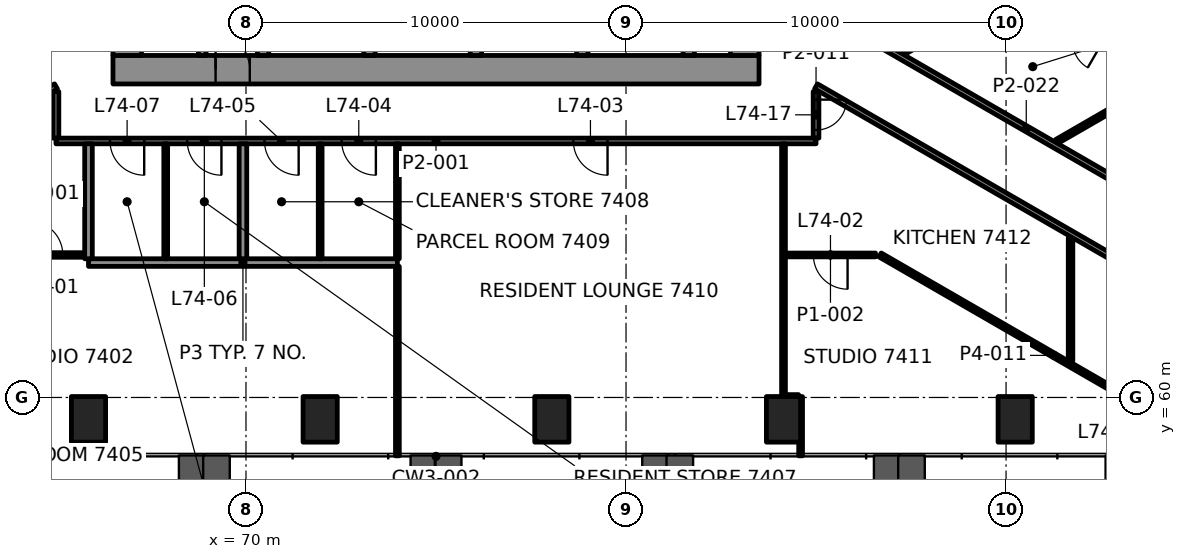
"""IFC4 building model, lengths in metres.
Left out: names, types, materials, properties, quantities, classifications, styles, units other than length and angle.
Written with IfcOpenShell. Run it as: python <this file> out.ifc"""

import sys

from ifc_helpers import new_model, si_unit, direction, frame, frame_2d, origin, origin_2d, place, context, subcontext, project, spatial, rectangle, hollow_rectangle, extrude, element, fill, save


model = new_model("IFC4")
c1 = context("Model", 3, precision=1e-05, world=origin(), true_north=direction((0.0, 1.0)))
c2 = subcontext(c1, "Body", "Model", "MODEL_VIEW")
j1 = project(units=[si_unit("LENGTHUNIT", "METRE"), si_unit("PLANEANGLEUNIT", "RADIAN")], contexts=[c1])
p1 = place(None, origin())
s1 = spatial("IfcSite", under=j1, at=p1, CompositionType="ELEMENT")
p2 = place(p1, origin())
s2 = spatial("IfcBuilding", under=s1, at=p2, CompositionType="ELEMENT")
p3 = place(p2, frame((0.0, 0.0, 305.6)))
s3 = spatial("IfcBuildingStorey", under=s2, at=p3, CompositionType="ELEMENT", Elevation=305.6)
for number, where, z_axis, x_axis in (
    (1, (65.856, 59.425, -0.0), (0.0, 0.0, 1.0), (1.0, 0.0, 0.0)),
    (2, (71.952, 59.425, -0.0), (0.0, 0.0, 1.0), (1.0, 0.0, 0.0)),
    (3, (78.048, 59.425, -0.0), (0.0, 0.0, 1.0), (1.0, 0.0, 0.0)),
    (4, (84.144, 59.425, -0.0), (0.0, 0.0, 1.0), (1.0, 0.0, 0.0)),
    (5, (90.24, 59.425, -0.0), (0.0, 0.0, 1.0), (1.0, 0.0, 0.0)),
):
    element("IfcColumn", number, at=place(p3, frame(where, z_axis=z_axis, x_axis=x_axis)), inside=s3, PredefinedType="COLUMN", context=c2, shape_type="SweptSolid", body=[
        extrude(hollow_rectangle(XDim=0.9, YDim=1.2, WallThickness=0.06, at=origin_2d()), origin(), (0.0, 0.0, 1.0), 3.5),
    ])
p4 = place(p3, frame((66.5, 68.625, 0.0), z_axis=(0.0, 0.0, 1.0), x_axis=(1.0, 0.0, 0.0)))
e6 = element("IfcWall", 6, at=p4, inside=s3, PredefinedType="SHEAR", context=c2, shape_type="SweptSolid", body=[
    extrude(rectangle(XDim=17.0, YDim=0.75, at=frame_2d((8.5, 0.0))), origin(), (0.0, 0.0, 1.0), 3.3),
])
p5 = place(p4, frame((2.7, 0.0, 0.0)))
e7 = element("IfcOpeningElement", 7, at=p5, cuts=e6, PredefinedType="OPENING", context=c2, shape_type="SweptSolid", body=[
    extrude(rectangle(XDim=0.9, YDim=2.1, at=frame_2d((0.45, 1.05))), frame((0.0, 0.385, 0.0), z_axis=(0.0, -1.0, 0.0), x_axis=(1.0, 0.0, 0.0)), (0.0, 0.0, 1.0), 0.77),
])
p6 = place(p3, frame((66.875, 69.0, 0.0), z_axis=(0.0, 0.0, 1.0), x_axis=(0.0, 1.0, 0.0)))
e8 = element("IfcWall", 8, at=p6, inside=s3, PredefinedType="SHEAR", context=c2, shape_type="SweptSolid", body=[
    extrude(rectangle(XDim=12.0, YDim=0.75, at=frame_2d((6.0, 0.0))), origin(), (0.0, 0.0, 1.0), 3.3),
])
p7 = place(p6, frame((3.7, 0.0, 0.0)))
e9 = element("IfcOpeningElement", 9, at=p7, cuts=e8, PredefinedType="OPENING", context=c2, shape_type="SweptSolid", body=[
    extrude(rectangle(XDim=1.2, YDim=2.1, at=frame_2d((0.6, 1.05))), frame((0.0, 0.385, 0.0), z_axis=(0.0, -1.0, 0.0), x_axis=(1.0, 0.0, 0.0)), (0.0, 0.0, 1.0), 0.77),
])
p8 = place(p6, frame((0.925, 0.0, 0.0)))
e10 = element("IfcOpeningElement", 10, at=p8, cuts=e8, PredefinedType="OPENING", context=c2, shape_type="SweptSolid", body=[
    extrude(rectangle(XDim=0.9, YDim=2.1, at=frame_2d((0.45, 1.05))), frame((0.0, 0.385, 0.0), z_axis=(0.0, -1.0, 0.0), x_axis=(1.0, 0.0, 0.0)), (0.0, 0.0, 1.0), 0.77),
])
p9 = place(p3, frame((83.125, 69.0, 0.0), z_axis=(0.0, 0.0, 1.0), x_axis=(0.0, 1.0, 0.0)))
e11 = element("IfcWall", 11, at=p9, inside=s3, PredefinedType="SHEAR", context=c2, shape_type="SweptSolid", body=[
    extrude(rectangle(XDim=12.0, YDim=0.75, at=frame_2d((6.0, 0.0))), origin(), (0.0, 0.0, 1.0), 3.3),
])
p10 = place(p9, frame((3.4, 0.0, 0.0)))
e12 = element("IfcOpeningElement", 12, at=p10, cuts=e11, PredefinedType="OPENING", context=c2, shape_type="SweptSolid", body=[
    extrude(rectangle(XDim=1.8, YDim=2.1, at=frame_2d((0.9, 1.05))), frame((0.0, 0.385, 0.0), z_axis=(0.0, -1.0, 0.0), x_axis=(1.0, 0.0, 0.0)), (0.0, 0.0, 1.0), 0.77),
])
for number, where, z_axis, x_axis in (
    (13, (70.45, 69.0, 0.0), (0.0, 0.0, 1.0), (0.0, 1.0, 0.0)),
    (14, (73.25, 69.0, 0.0), (0.0, 0.0, 1.0), (0.0, 1.0, 0.0)),
    (15, (76.05, 69.0, 0.0), (0.0, 0.0, 1.0), (0.0, 1.0, 0.0)),
    (16, (78.85, 69.0, 0.0), (0.0, 0.0, 1.0), (0.0, 1.0, 0.0)),
    (17, (81.65, 69.0, 0.0), (0.0, 0.0, 1.0), (0.0, 1.0, 0.0)),
):
    element("IfcWall", number, at=place(p3, frame(where, z_axis=z_axis, x_axis=x_axis)), inside=s3, PredefinedType="SHEAR", context=c2, shape_type="SweptSolid", body=[
        extrude(rectangle(XDim=2.6, YDim=0.3, at=frame_2d((1.3, 0.0))), origin(), (0.0, 0.0, 1.0), 3.3),
    ])
p11 = place(p3, frame((84.194, 60.025, 0.0), z_axis=(0.0, 0.0, 1.0), x_axis=(1.0, 0.0, 0.0)))
e18 = element("IfcWall", 18, at=p11, inside=s3, PredefinedType="PARTITIONING", context=c2, shape_type="SweptSolid", body=[
    extrude(rectangle(XDim=0.347, YDim=0.1, at=frame_2d((0.173, 0.0))), origin(), (0.0, 0.0, 1.0), 2.7),
])
p12 = place(p3, frame((65.856, 63.55, 0.0), z_axis=(0.0, 0.0, 1.0), x_axis=(1.0, 0.0, 0.0)))
e19 = element("IfcWall", 19, at=p12, inside=s3, PredefinedType="PARTITIONING", context=c2, shape_type="SweptSolid", body=[
    extrude(rectangle(XDim=8.128, YDim=0.2, at=frame_2d((4.064, 0.0))), origin(), (0.0, 0.0, 1.0), 2.7),
])
p13 = place(p3, frame((63.704, 63.75, 0.0), z_axis=(0.0, 0.0, 1.0), x_axis=(1.0, 0.0, 0.0)))
e20 = element("IfcWall", 20, at=p13, inside=s3, PredefinedType="PARTITIONING", context=c2, shape_type="SweptSolid", body=[
    extrude(rectangle(XDim=2.052, YDim=0.12, at=frame_2d((1.026, 0.0))), origin(), (0.0, 0.0, 1.0), 2.7),
])
p14 = place(p13, frame((0.576, 0.0, 0.0)))
e21 = element("IfcOpeningElement", 21, at=p14, cuts=e20, PredefinedType="OPENING", context=c2, shape_type="SweptSolid", body=[
    extrude(rectangle(XDim=0.9, YDim=2.1, at=frame_2d((0.45, 1.05))), frame((0.0, 0.07, 0.0), z_axis=(0.0, -1.0, 0.0), x_axis=(1.0, 0.0, 0.0)), (0.0, 0.0, 1.0), 0.14),
])
p15 = place(p3, frame((86.566, 63.75, 0.0), z_axis=(0.0, 0.0, 1.0), x_axis=(-1.0, 0.0, 0.0)))
e22 = element("IfcWall", 22, at=p15, inside=s3, PredefinedType="PARTITIONING", context=c2, shape_type="SweptSolid", body=[
    extrude(rectangle(XDim=2.372, YDim=0.1, at=frame_2d((1.186, 0.0))), origin(), (0.0, 0.0, 1.0), 2.7),
])
p16 = place(p15, frame((0.736, 0.0, 0.0)))
e23 = element("IfcOpeningElement", 23, at=p16, cuts=e22, PredefinedType="OPENING", context=c2, shape_type="SweptSolid", body=[
    extrude(rectangle(XDim=0.9, YDim=2.1, at=frame_2d((0.45, 1.05))), frame((0.0, 0.06, 0.0), z_axis=(0.0, -1.0, 0.0), x_axis=(1.0, 0.0, 0.0)), (0.0, 0.0, 1.0), 0.12),
])
p17 = place(p3, frame((85.0, 66.75, 0.0), z_axis=(0.0, 0.0, 1.0), x_axis=(-1.0, 0.0, 0.0)))
e24 = element("IfcWall", 24, at=p17, inside=s3, PredefinedType="PARTITIONING", context=c2, shape_type="SweptSolid", body=[
    extrude(rectangle(XDim=20.0, YDim=0.15, at=frame_2d((10.0, 0.0))), origin(), (0.0, 0.0, 1.0), 2.7),
])
p18 = place(p17, frame((5.486, 0.0, 0.0)))
e25 = element("IfcOpeningElement", 25, at=p18, cuts=e24, PredefinedType="OPENING", context=c2, shape_type="SweptSolid", body=[
    extrude(rectangle(XDim=0.9, YDim=2.1, at=frame_2d((0.45, 1.05))), frame((0.0, 0.085, 0.0), z_axis=(0.0, -1.0, 0.0), x_axis=(1.0, 0.0, 0.0)), (0.0, 0.0, 1.0), 0.17),
])
p19 = place(p17, frame((11.582, 0.0, 0.0)))
e26 = element("IfcOpeningElement", 26, at=p19, cuts=e24, PredefinedType="OPENING", context=c2, shape_type="SweptSolid", body=[
    extrude(rectangle(XDim=0.9, YDim=2.1, at=frame_2d((0.45, 1.05))), frame((0.0, 0.085, 0.0), z_axis=(0.0, -1.0, 0.0), x_axis=(1.0, 0.0, 0.0)), (0.0, 0.0, 1.0), 0.17),
])
p20 = place(p17, frame((13.614, 0.0, 0.0)))
e27 = element("IfcOpeningElement", 27, at=p20, cuts=e24, PredefinedType="OPENING", context=c2, shape_type="SweptSolid", body=[
    extrude(rectangle(XDim=0.9, YDim=2.1, at=frame_2d((0.45, 1.05))), frame((0.0, 0.085, 0.0), z_axis=(0.0, -1.0, 0.0), x_axis=(1.0, 0.0, 0.0)), (0.0, 0.0, 1.0), 0.17),
])
p21 = place(p17, frame((15.646, 0.0, 0.0)))
e28 = element("IfcOpeningElement", 28, at=p21, cuts=e24, PredefinedType="OPENING", context=c2, shape_type="SweptSolid", body=[
    extrude(rectangle(XDim=0.9, YDim=2.1, at=frame_2d((0.45, 1.05))), frame((0.0, 0.085, 0.0), z_axis=(0.0, -1.0, 0.0), x_axis=(1.0, 0.0, 0.0)), (0.0, 0.0, 1.0), 0.17),
])
p22 = place(p17, frame((17.678, 0.0, 0.0)))
e29 = element("IfcOpeningElement", 29, at=p22, cuts=e24, PredefinedType="OPENING", context=c2, shape_type="SweptSolid", body=[
    extrude(rectangle(XDim=0.9, YDim=2.1, at=frame_2d((0.45, 1.05))), frame((0.0, 0.085, 0.0), z_axis=(0.0, -1.0, 0.0), x_axis=(1.0, 0.0, 0.0)), (0.0, 0.0, 1.0), 0.17),
])
for number, where, z_axis, x_axis in (
    (30, (91.333, 66.736, 0.0), (0.0, 0.0, 1.0), (0.866, 0.5, 0.0)),
    (31, (87.292, 69.069, 0.0), (0.0, 0.0, 1.0), (0.866, 0.5, 0.0)),
):
    element("IfcWall", number, at=place(p3, frame(where, z_axis=z_axis, x_axis=x_axis)), inside=s3, PredefinedType="PARTITIONING", context=c2, shape_type="SweptSolid", body=[
        extrude(rectangle(XDim=3.228, YDim=0.12, at=frame_2d((1.614, 0.0))), origin(), (0.0, 0.0, 1.0), 2.7),
    ])
p23 = place(p3, frame((65.0, 68.187, 0.0), z_axis=(0.0, 0.0, 1.0), x_axis=(-0.866026430432, -0.49999822179, 0.0)))
e32 = element("IfcWall", 32, at=p23, inside=s3, PredefinedType="PARTITIONING", context=c2, shape_type="SweptSolid", body=[
    extrude(rectangle(XDim=11.648, YDim=0.15, at=frame_2d((5.824, 0.0))), origin(), (0.0, 0.0, 1.0), 2.547),
])
p24 = place(p23, frame((8.296, 0.0, 0.0)))
e33 = element("IfcOpeningElement", 33, at=p24, cuts=e32, PredefinedType="OPENING", context=c2, shape_type="SweptSolid", body=[
    extrude(rectangle(XDim=1.0, YDim=2.1, at=frame_2d((0.5, 1.05))), frame((0.0, 0.085, 0.0), z_axis=(0.0, -1.0, 0.0), x_axis=(1.0, 0.0, 0.0)), (0.0, 0.0, 1.0), 0.17),
])
p25 = place(p3, frame((54.012, 63.922, 0.0), z_axis=(0.0, 0.0, 1.0), x_axis=(0.866028779199, 0.499994153564, 0.0)))
e34 = element("IfcWall", 34, at=p25, inside=s3, PredefinedType="PARTITIONING", context=c2, shape_type="SweptSolid", body=[
    extrude(rectangle(XDim=12.601, YDim=0.15, at=frame_2d((6.3, 0.0))), origin(), (0.0, 0.0, 1.0), 2.7),
])
p26 = place(p25, frame((2.542, 0.0, 0.0)))
e35 = element("IfcOpeningElement", 35, at=p26, cuts=e34, PredefinedType="OPENING", context=c2, shape_type="SweptSolid", body=[
    extrude(rectangle(XDim=1.0, YDim=2.1, at=frame_2d((0.5, 1.05))), frame((0.0, 0.085, 0.0), z_axis=(0.0, -1.0, 0.0), x_axis=(1.0, 0.0, 0.0)), (0.0, 0.0, 1.0), 0.17),
])
p27 = place(p25, frame((8.639, 0.0, 0.0)))
e36 = element("IfcOpeningElement", 36, at=p27, cuts=e34, PredefinedType="OPENING", context=c2, shape_type="SweptSolid", body=[
    extrude(rectangle(XDim=1.0, YDim=2.1, at=frame_2d((0.5, 1.05))), frame((0.0, 0.085, 0.0), z_axis=(0.0, -1.0, 0.0), x_axis=(1.0, 0.0, 0.0)), (0.0, 0.0, 1.0), 0.17),
])
p28 = place(p3, frame((91.697, 60.966, 0.0), z_axis=(0.0, 0.0, 1.0), x_axis=(0.0, 1.0, 0.0)))
e37 = element("IfcWall", 37, at=p28, inside=s3, PredefinedType="PARTITIONING", context=c2, shape_type="SweptSolid", body=[
    extrude(rectangle(XDim=3.228, YDim=0.12, at=frame_2d((1.614, 0.0))), origin(), (0.0, 0.0, 1.0), 2.7),
])
p29 = place(p3, frame((85.0, 68.051, 0.0), z_axis=(0.0, 0.0, 1.0), x_axis=(0.0, -1.0, 0.0)))
e38 = element("IfcWall", 38, at=p29, inside=s3, PredefinedType="PARTITIONING", context=c2, shape_type="SweptSolid", body=[
    extrude(rectangle(XDim=1.226, YDim=0.15, at=frame_2d((0.613, 0.0))), origin(), (0.0, 0.0, 1.0), 2.547),
])
p30 = place(p29, frame((0.213, 0.0, 0.0)))
e39 = element("IfcOpeningElement", 39, at=p30, cuts=e38, PredefinedType="OPENING", context=c2, shape_type="SweptSolid", body=[
    extrude(rectangle(XDim=0.8, YDim=2.1, at=frame_2d((0.4, 1.05))), frame((0.0, 0.085, 0.0), z_axis=(0.0, -1.0, 0.0), x_axis=(1.0, 0.0, 0.0)), (0.0, 0.0, 1.0), 0.17),
])
p31 = place(p3, frame((84.594, 58.465, 0.0), z_axis=(0.0, 0.0, 1.0), x_axis=(0.0, 1.0, 0.0)))
e40 = element("IfcWall", 40, at=p31, inside=s3, PredefinedType="PARTITIONING", context=c2, shape_type="SweptSolid", body=[
    extrude(rectangle(XDim=1.557, YDim=0.1, at=frame_2d((0.778, 0.0))), origin(), (0.0, 0.0, 1.0), 2.7),
])
p32 = place(p3, frame((84.144, 60.025, 0.0), z_axis=(0.0, 0.0, 1.0), x_axis=(0.0, 1.0, 0.0)))
e41 = element("IfcWall", 41, at=p32, inside=s3, PredefinedType="PARTITIONING", context=c2, shape_type="SweptSolid", body=[
    extrude(rectangle(XDim=6.65, YDim=0.1, at=frame_2d((3.325, 0.0))), origin(), (0.0, 0.0, 1.0), 2.7),
])
p33 = place(p3, frame((73.984, 58.465, 0.0), z_axis=(0.0, 0.0, 1.0), x_axis=(0.0, 1.0, 0.0)))
e42 = element("IfcWall", 42, at=p33, inside=s3, PredefinedType="PARTITIONING", context=c2, shape_type="SweptSolid", body=[
    extrude(rectangle(XDim=4.985, YDim=0.1, at=frame_2d((2.493, 0.0))), origin(), (0.0, 0.0, 1.0), 2.688),
])
p34 = place(p3, frame((71.952, 63.65, 0.0), z_axis=(0.0, 0.0, 1.0), x_axis=(0.0, 1.0, 0.0)))
e43 = element("IfcWall", 43, at=p34, inside=s3, PredefinedType="PARTITIONING", context=c2, shape_type="SweptSolid", body=[
    extrude(rectangle(XDim=3.025, YDim=0.1, at=frame_2d((1.513, 0.0))), origin(), (0.0, 0.0, 1.0), 2.7),
])
p35 = place(p3, frame((69.92, 63.65, 0.0), z_axis=(0.0, 0.0, 1.0), x_axis=(0.0, 1.0, 0.0)))
e44 = element("IfcWall", 44, at=p35, inside=s3, PredefinedType="PARTITIONING", context=c2, shape_type="SweptSolid", body=[
    extrude(rectangle(XDim=3.025, YDim=0.2, at=frame_2d((1.513, 0.0))), origin(), (0.0, 0.0, 1.0), 2.7),
])
p36 = place(p3, frame((67.888, 63.65, 0.0), z_axis=(0.0, 0.0, 1.0), x_axis=(0.0, 1.0, 0.0)))
e45 = element("IfcWall", 45, at=p36, inside=s3, PredefinedType="PARTITIONING", context=c2, shape_type="SweptSolid", body=[
    extrude(rectangle(XDim=3.025, YDim=0.1, at=frame_2d((1.513, 0.0))), origin(), (0.0, 0.0, 1.0), 2.7),
])
p37 = place(p3, frame((65.856, 63.65, 0.0), z_axis=(0.0, 0.0, 1.0), x_axis=(0.0, 1.0, 0.0)))
e46 = element("IfcWall", 46, at=p37, inside=s3, PredefinedType="PARTITIONING", context=c2, shape_type="SweptSolid", body=[
    extrude(rectangle(XDim=3.025, YDim=0.2, at=frame_2d((1.513, 0.0))), origin(), (0.0, 0.0, 1.0), 2.7),
])
p38 = place(p3, frame((65.0, 66.825, 0.0), z_axis=(0.0, 0.0, 1.0), x_axis=(0.0, 1.0, 0.0)))
e47 = element("IfcWall", 47, at=p38, inside=s3, PredefinedType="PARTITIONING", context=c2, shape_type="SweptSolid", body=[
    extrude(rectangle(XDim=1.226, YDim=0.15, at=frame_2d((0.613, 0.0))), origin(), (0.0, 0.0, 1.0), 2.547),
])
p39 = place(p3, frame((99.74, 65.22, 0.0), z_axis=(0.0, 0.0, 1.0), x_axis=(-0.866029646425, 0.499992651459, 0.0)))
e48 = element("IfcWall", 48, at=p39, inside=s3, PredefinedType="PARTITIONING", context=c2, shape_type="SweptSolid", body=[
    extrude(rectangle(XDim=13.505, YDim=0.12, at=frame_2d((6.752, 0.0))), origin(), (0.0, 0.0, 1.0), 2.7),
])
p40 = place(p39, frame((3.197, 0.0, 0.0)))
e49 = element("IfcOpeningElement", 49, at=p40, cuts=e48, PredefinedType="OPENING", context=c2, shape_type="SweptSolid", body=[
    extrude(rectangle(XDim=0.9, YDim=2.1, at=frame_2d((0.45, 1.05))), frame((0.0, 0.07, 0.0), z_axis=(0.0, -1.0, 0.0), x_axis=(1.0, 0.0, 0.0)), (0.0, 0.0, 1.0), 0.14),
])
p41 = place(p39, frame((8.303, 0.0, 0.0)))
e50 = element("IfcOpeningElement", 50, at=p41, cuts=e48, PredefinedType="OPENING", context=c2, shape_type="SweptSolid", body=[
    extrude(rectangle(XDim=0.8, YDim=2.1, at=frame_2d((0.4, 1.05))), frame((0.0, 0.07, 0.0), z_axis=(0.0, -1.0, 0.0), x_axis=(1.0, 0.0, 0.0)), (0.0, 0.0, 1.0), 0.14),
])
p42 = place(p39, frame((11.721, 0.0, 0.0)))
e51 = element("IfcOpeningElement", 51, at=p42, cuts=e48, PredefinedType="OPENING", context=c2, shape_type="SweptSolid", body=[
    extrude(rectangle(XDim=0.9, YDim=2.1, at=frame_2d((0.45, 1.05))), frame((0.0, 0.07, 0.0), z_axis=(0.0, -1.0, 0.0), x_axis=(1.0, 0.0, 0.0)), (0.0, 0.0, 1.0), 0.14),
])
p43 = place(p3, frame((85.075, 70.222, 0.0), z_axis=(0.0, 0.0, 1.0), x_axis=(0.866023935413, -0.500002543286, 0.0)))
e52 = element("IfcWall", 52, at=p43, inside=s3, PredefinedType="PARTITIONING", context=c2, shape_type="SweptSolid", body=[
    extrude(rectangle(XDim=12.601, YDim=0.15, at=frame_2d((6.3, 0.0))), origin(), (0.0, 0.0, 1.0), 2.7),
])
p44 = place(p43, frame((9.249, 0.0, 0.0)))
e53 = element("IfcOpeningElement", 53, at=p44, cuts=e52, PredefinedType="OPENING", context=c2, shape_type="SweptSolid", body=[
    extrude(rectangle(XDim=1.0, YDim=2.1, at=frame_2d((0.5, 1.05))), frame((0.0, 0.085, 0.0), z_axis=(0.0, -1.0, 0.0), x_axis=(1.0, 0.0, 0.0)), (0.0, 0.0, 1.0), 0.17),
])
p45 = place(p3, frame((95.088, 62.363, 0.0), z_axis=(0.0, 0.0, 1.0), x_axis=(-0.866026430432, 0.49999822179, 0.0)))
e54 = element("IfcWall", 54, at=p45, inside=s3, PredefinedType="PARTITIONING", context=c2, shape_type="SweptSolid", body=[
    extrude(rectangle(XDim=11.648, YDim=0.15, at=frame_2d((5.824, 0.0))), origin(), (0.0, 0.0, 1.0), 2.547),
])
p46 = place(p3, frame((86.686, 63.75, 0.0), z_axis=(0.0, 0.0, 1.0), x_axis=(0.866034434898, -0.499984357326, 0.0)))
e55 = element("IfcWall", 55, at=p46, inside=s3, PredefinedType="PARTITIONING", context=c2, shape_type="SweptSolid", body=[
    extrude(rectangle(XDim=10.571, YDim=0.12, at=frame_2d((5.285, 0.0))), origin(), (0.0, 0.0, 1.0), 2.7),
])
p47 = place(p46, frame((7.2, 0.0, 0.0)))
e56 = element("IfcOpeningElement", 56, at=p47, cuts=e55, PredefinedType="OPENING", context=c2, shape_type="SweptSolid", body=[
    extrude(rectangle(XDim=0.8, YDim=2.1, at=frame_2d((0.4, 1.05))), frame((0.0, 0.07, 0.0), z_axis=(0.0, -1.0, 0.0), x_axis=(1.0, 0.0, 0.0)), (0.0, 0.0, 1.0), 0.14),
])
p48 = place(p3, frame((73.984, 63.65, 0.0), z_axis=(0.0, 0.0, 1.0), x_axis=(0.0, 1.0, 0.0)))
e57 = element("IfcWall", 57, at=p48, inside=s3, PredefinedType="PARTITIONING", context=c2, shape_type="SweptSolid", body=[
    extrude(rectangle(XDim=3.025, YDim=0.1, at=frame_2d((1.513, 0.0))), origin(), (0.0, 0.0, 1.0), 2.7),
])
p49 = place(p3, frame((68.85, 69.0, 0.0), z_axis=(0.0, 0.0, 1.0), x_axis=(0.0, 1.0, 0.0)))
e58 = element("IfcWall", 58, at=p49, inside=s3, PredefinedType="PARTITIONING", context=c2, shape_type="SweptSolid", body=[
    extrude(rectangle(XDim=2.65, YDim=0.2, at=frame_2d((1.325, 0.0))), origin(), (0.0, 0.0, 1.0), 3.3),
])
p50 = place(p14, origin())
e59 = element("IfcDoor", 59, at=p50, inside=s3, OperationType="SINGLE_SWING_LEFT", PredefinedType="DOOR", context=c2, shape_type="SweptSolid", body=[
    extrude(rectangle(XDim=0.9, YDim=2.1, at=frame_2d((0.45, 1.05))), frame((0.0, 0.025, 0.0), z_axis=(0.0, -1.0, 0.0), x_axis=(1.0, 0.0, 0.0)), (0.0, 0.0, 1.0), 0.05),
])
fill(e21, e59)
p51 = place(p16, origin())
e60 = element("IfcDoor", 60, at=p51, inside=s3, OperationType="SINGLE_SWING_LEFT", PredefinedType="DOOR", context=c2, shape_type="SweptSolid", body=[
    extrude(rectangle(XDim=0.9, YDim=2.1, at=frame_2d((0.45, 1.05))), frame((0.0, 0.025, 0.0), z_axis=(0.0, -1.0, 0.0), x_axis=(1.0, 0.0, 0.0)), (0.0, 0.0, 1.0), 0.05),
])
fill(e23, e60)
p52 = place(p18, origin())
e61 = element("IfcDoor", 61, at=p52, inside=s3, OperationType="SINGLE_SWING_RIGHT", PredefinedType="DOOR", context=c2, shape_type="SweptSolid", body=[
    extrude(rectangle(XDim=0.9, YDim=2.1, at=frame_2d((0.45, 1.05))), frame((0.0, 0.025, 0.0), z_axis=(0.0, -1.0, 0.0), x_axis=(1.0, 0.0, 0.0)), (0.0, 0.0, 1.0), 0.05),
])
fill(e25, e61)
p53 = place(p19, origin())
e62 = element("IfcDoor", 62, at=p53, inside=s3, OperationType="SINGLE_SWING_LEFT", PredefinedType="DOOR", context=c2, shape_type="SweptSolid", body=[
    extrude(rectangle(XDim=0.9, YDim=2.1, at=frame_2d((0.45, 1.05))), frame((0.0, 0.025, 0.0), z_axis=(0.0, -1.0, 0.0), x_axis=(1.0, 0.0, 0.0)), (0.0, 0.0, 1.0), 0.05),
])
fill(e26, e62)
p54 = place(p20, origin())
e63 = element("IfcDoor", 63, at=p54, inside=s3, OperationType="SINGLE_SWING_RIGHT", PredefinedType="DOOR", context=c2, shape_type="SweptSolid", body=[
    extrude(rectangle(XDim=0.9, YDim=2.1, at=frame_2d((0.45, 1.05))), frame((0.0, 0.025, 0.0), z_axis=(0.0, -1.0, 0.0), x_axis=(1.0, 0.0, 0.0)), (0.0, 0.0, 1.0), 0.05),
])
fill(e27, e63)
p55 = place(p21, origin())
e64 = element("IfcDoor", 64, at=p55, inside=s3, OperationType="SINGLE_SWING_LEFT", PredefinedType="DOOR", context=c2, shape_type="SweptSolid", body=[
    extrude(rectangle(XDim=0.9, YDim=2.1, at=frame_2d((0.45, 1.05))), frame((0.0, 0.025, 0.0), z_axis=(0.0, -1.0, 0.0), x_axis=(1.0, 0.0, 0.0)), (0.0, 0.0, 1.0), 0.05),
])
fill(e28, e64)
p56 = place(p22, origin())
e65 = element("IfcDoor", 65, at=p56, inside=s3, OperationType="SINGLE_SWING_RIGHT", PredefinedType="DOOR", context=c2, shape_type="SweptSolid", body=[
    extrude(rectangle(XDim=0.9, YDim=2.1, at=frame_2d((0.45, 1.05))), frame((0.0, 0.025, 0.0), z_axis=(0.0, -1.0, 0.0), x_axis=(1.0, 0.0, 0.0)), (0.0, 0.0, 1.0), 0.05),
])
fill(e29, e65)
p57 = place(p30, origin())
e66 = element("IfcDoor", 66, at=p57, inside=s3, OperationType="SINGLE_SWING_RIGHT", PredefinedType="DOOR", context=c2, shape_type="SweptSolid", body=[
    extrude(rectangle(XDim=0.8, YDim=2.1, at=frame_2d((0.4, 1.05))), frame((0.0, 0.025, 0.0), z_axis=(0.0, -1.0, 0.0), x_axis=(1.0, 0.0, 0.0)), (0.0, 0.0, 1.0), 0.05),
])
fill(e39, e66)
p58 = place(p5, origin())
e67 = element("IfcDoor", 67, at=p58, inside=s3, OperationType="SINGLE_SWING_LEFT", PredefinedType="DOOR", context=c2, shape_type="SweptSolid", body=[
    extrude(rectangle(XDim=0.9, YDim=2.1, at=frame_2d((0.45, 1.05))), frame((0.0, 0.095, 0.0), z_axis=(0.0, -1.0, 0.0), x_axis=(1.0, 0.0, 0.0)), (0.0, 0.0, 1.0), 0.19),
])
fill(e7, e67)
save(model, sys.argv[1])
